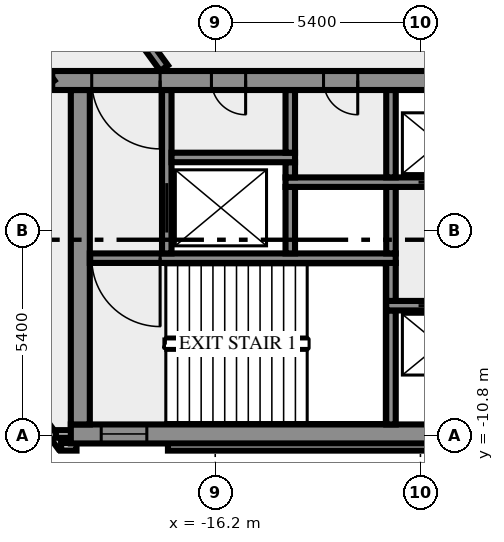
"""IFC4 building model, lengths in metres.
Left out: names, types, materials, properties, quantities, classifications, styles, units other than length and angle.
Written with IfcOpenShell. Run it as: python <this file> out.ifc"""

import sys

from ifc_helpers import new_model, si_unit, direction, frame, frame_2d, origin, place, context, subcontext, project, spatial, rectangle, extrude, element, fill, save


model = new_model("IFC4")
c1 = context("Model", 3, precision=1e-05, world=origin(), true_north=direction((0.0, 1.0)))
c2 = subcontext(c1, "Body", "Model", "MODEL_VIEW")
j1 = project(units=[si_unit("LENGTHUNIT", "METRE"), si_unit("PLANEANGLEUNIT", "RADIAN")], contexts=[c1])
p1 = place(None, origin())
s1 = spatial("IfcSite", under=j1, at=p1, CompositionType="ELEMENT")
p2 = place(p1, origin())
s2 = spatial("IfcBuilding", under=s1, at=p2, CompositionType="ELEMENT")
p3 = place(p2, frame((0.0, 0.0, 67.0)))
s3 = spatial("IfcBuildingStorey", under=s2, at=p3, CompositionType="ELEMENT", Elevation=67.0)
p4 = place(p3, frame((-21.833, -8.909, 0.0), z_axis=(0.0, 0.0, 1.0), x_axis=(0.587766567315, -0.809030569476, 0.0)))
e1 = element("IfcWall", 1, at=p4, inside=s3, PredefinedType="SOLIDWALL", context=c2, shape_type="SweptSolid", body=[
    extrude(rectangle(XDim=2.688, YDim=0.2, at=frame_2d((1.344, 0.0))), origin(), (0.0, 0.0, 1.0), 3.65),
])
p5 = place(p3, frame((-20.256, -11.088, 0.0), z_axis=(0.0, 0.0, 1.0), x_axis=(1.0, 0.0, 0.0)))
e2 = element("IfcWall", 2, at=p5, inside=s3, PredefinedType="SOLIDWALL", context=c2, shape_type="SweptSolid", body=[
    extrude(rectangle(XDim=0.406, YDim=0.2, at=frame_2d((0.203, 0.0))), origin(), (0.0, 0.0, 1.0), 3.65),
])
p6 = place(p3, frame((-17.444, -11.088, 0.0), z_axis=(0.0, 0.0, 1.0), x_axis=(1.0, 0.0, 0.0)))
e3 = element("IfcWall", 3, at=p6, inside=s3, PredefinedType="SOLIDWALL", context=c2, shape_type="SweptSolid", body=[
    extrude(rectangle(XDim=34.888, YDim=0.2, at=frame_2d((17.444, 0.0))), origin(), (0.0, 0.0, 1.0), 3.65),
])
p7 = place(p3, frame((-19.98, -10.75, 0.0), z_axis=(0.0, 0.0, 1.0), x_axis=(-1.0, 0.0, 0.0)))
e4 = element("IfcWall", 4, at=p7, inside=s3, PredefinedType="SOLIDWALL", context=c2, shape_type="SweptSolid", body=[
    extrude(rectangle(XDim=0.417, YDim=0.2, at=frame_2d((0.208, 0.0))), origin(), (0.0, 0.0, 1.0), 3.65),
])
p8 = place(p3, frame((-20.0, -10.75, 0.0), z_axis=(0.0, 0.0, 1.0), x_axis=(1.0, 0.0, 0.0)))
e5 = element("IfcWall", 5, at=p8, inside=s3, PredefinedType="SHEAR", context=c2, shape_type="SweptSolid", body=[
    extrude(rectangle(XDim=40.0, YDim=0.5, at=frame_2d((20.0, 0.0))), origin(), (0.0, 0.0, 1.0), 3.65),
])
p9 = place(p8, frame((0.8, 0.0, 1.0)))
e6 = element("IfcOpeningElement", 6, at=p9, cuts=e5, PredefinedType="OPENING", context=c2, shape_type="SweptSolid", body=[
    extrude(rectangle(XDim=1.2, YDim=1.2, at=frame_2d((0.6, 0.6))), frame((0.0, 0.26, 0.0), z_axis=(0.0, -1.0, 0.0), x_axis=(1.0, 0.0, 0.0)), (0.0, 0.0, 1.0), 0.52),
])
p10 = place(p8, frame((38.0, 0.0, 1.0)))
e7 = element("IfcOpeningElement", 7, at=p10, cuts=e5, PredefinedType="OPENING", context=c2, shape_type="SweptSolid", body=[
    extrude(rectangle(XDim=1.2, YDim=1.2, at=frame_2d((0.6, 0.6))), frame((0.0, 0.26, 0.0), z_axis=(0.0, -1.0, 0.0), x_axis=(1.0, 0.0, 0.0)), (0.0, 0.0, 1.0), 0.52),
])
p11 = place(p3, frame((-19.75, -10.5, 0.0), z_axis=(0.0, 0.0, 1.0), x_axis=(0.0, 1.0, 0.0)))
e8 = element("IfcWall", 8, at=p11, inside=s3, PredefinedType="SHEAR", context=c2, shape_type="SweptSolid", body=[
    extrude(rectangle(XDim=8.8, YDim=0.5, at=frame_2d((4.4, 0.0))), origin(), (0.0, 0.0, 1.0), 3.65),
])
p12 = place(p3, frame((-11.575, -10.5, 0.0), z_axis=(0.0, 0.0, 1.0), x_axis=(0.0, 1.0, 0.0)))
e9 = element("IfcWall", 9, at=p12, inside=s3, PredefinedType="SHEAR", context=c2, shape_type="SweptSolid", body=[
    extrude(rectangle(XDim=3.0, YDim=0.25, at=frame_2d((1.5, 0.0))), origin(), (0.0, 0.0, 1.0), 3.65),
])
p13 = place(p3, frame((11.7, -7.375, 0.0), z_axis=(0.0, 0.0, 1.0), x_axis=(-1.0, 0.0, 0.0)))
e10 = element("IfcWall", 10, at=p13, inside=s3, PredefinedType="SHEAR", context=c2, shape_type="SweptSolid", body=[
    extrude(rectangle(XDim=23.4, YDim=0.25, at=frame_2d((11.7, 0.0))), origin(), (0.0, 0.0, 1.0), 3.65),
])
p14 = place(p13, frame((21.45, 0.0, 0.0)))
e11 = element("IfcOpeningElement", 11, at=p14, cuts=e10, PredefinedType="OPENING", context=c2, shape_type="SweptSolid", body=[
    extrude(rectangle(XDim=1.1, YDim=2.1, at=frame_2d((0.55, 1.05))), frame((0.0, 0.135, 0.0), z_axis=(0.0, -1.0, 0.0), x_axis=(1.0, 0.0, 0.0)), (0.0, 0.0, 1.0), 0.27),
])
p15 = place(p13, frame((18.95, 0.0, 0.0)))
e12 = element("IfcOpeningElement", 12, at=p15, cuts=e10, PredefinedType="OPENING", context=c2, shape_type="SweptSolid", body=[
    extrude(rectangle(XDim=1.1, YDim=2.1, at=frame_2d((0.55, 1.05))), frame((0.0, 0.135, 0.0), z_axis=(0.0, -1.0, 0.0), x_axis=(1.0, 0.0, 0.0)), (0.0, 0.0, 1.0), 0.27),
])
p16 = place(p13, frame((16.45, 0.0, 0.0)))
e13 = element("IfcOpeningElement", 13, at=p16, cuts=e10, PredefinedType="OPENING", context=c2, shape_type="SweptSolid", body=[
    extrude(rectangle(XDim=1.1, YDim=2.1, at=frame_2d((0.55, 1.05))), frame((0.0, 0.135, 0.0), z_axis=(0.0, -1.0, 0.0), x_axis=(1.0, 0.0, 0.0)), (0.0, 0.0, 1.0), 0.27),
])
p17 = place(p13, frame((14.65, 0.0, 0.0)))
e14 = element("IfcOpeningElement", 14, at=p17, cuts=e10, PredefinedType="OPENING", context=c2, shape_type="SweptSolid", body=[
    extrude(rectangle(XDim=0.8, YDim=2.1, at=frame_2d((0.4, 1.05))), frame((0.0, 0.135, 0.0), z_axis=(0.0, -1.0, 0.0), x_axis=(1.0, 0.0, 0.0)), (0.0, 0.0, 1.0), 0.27),
])
p18 = place(p13, frame((12.8, 0.0, 0.0)))
e15 = element("IfcOpeningElement", 15, at=p18, cuts=e10, PredefinedType="OPENING", context=c2, shape_type="SweptSolid", body=[
    extrude(rectangle(XDim=0.9, YDim=2.1, at=frame_2d((0.45, 1.05))), frame((0.0, 0.135, 0.0), z_axis=(0.0, -1.0, 0.0), x_axis=(1.0, 0.0, 0.0)), (0.0, 0.0, 1.0), 0.27),
])
p19 = place(p13, frame((10.7, 0.0, 0.0)))
e16 = element("IfcOpeningElement", 16, at=p19, cuts=e10, PredefinedType="OPENING", context=c2, shape_type="SweptSolid", body=[
    extrude(rectangle(XDim=0.9, YDim=2.1, at=frame_2d((0.45, 1.05))), frame((0.0, 0.135, 0.0), z_axis=(0.0, -1.0, 0.0), x_axis=(1.0, 0.0, 0.0)), (0.0, 0.0, 1.0), 0.27),
])
p20 = place(p3, frame((-11.575, -7.25, 0.0), z_axis=(0.0, 0.0, 1.0), x_axis=(0.0, 1.0, 0.0)))
e17 = element("IfcWall", 17, at=p20, inside=s3, PredefinedType="SHEAR", context=c2, shape_type="SweptSolid", body=[
    extrude(rectangle(XDim=1.0, YDim=0.25, at=frame_2d((0.5, 0.0))), origin(), (0.0, 0.0, 1.0), 3.65),
])
p21 = place(p3, frame((-11.45, -6.125, 0.0), z_axis=(0.0, 0.0, 1.0), x_axis=(-1.0, 0.0, 0.0)))
e18 = element("IfcWall", 18, at=p21, inside=s3, PredefinedType="SHEAR", context=c2, shape_type="SweptSolid", body=[
    extrude(rectangle(XDim=8.05, YDim=0.25, at=frame_2d((4.025, 0.0))), origin(), (0.0, 0.0, 1.0), 3.65),
])
p22 = place(p21, frame((6.2, 0.0, 0.0)))
e19 = element("IfcOpeningElement", 19, at=p22, cuts=e18, PredefinedType="OPENING", context=c2, shape_type="SweptSolid", body=[
    extrude(rectangle(XDim=1.8, YDim=2.1, at=frame_2d((0.9, 1.05))), frame((0.0, 0.135, 0.0), z_axis=(0.0, -1.0, 0.0), x_axis=(1.0, 0.0, 0.0)), (0.0, 0.0, 1.0), 0.27),
])
p23 = place(p3, frame((-17.475, -6.0, 0.0), z_axis=(0.0, 0.0, 1.0), x_axis=(0.0, 1.0, 0.0)))
e20 = element("IfcWall", 20, at=p23, inside=s3, PredefinedType="SHEAR", context=c2, shape_type="SweptSolid", body=[
    extrude(rectangle(XDim=4.3, YDim=0.25, at=frame_2d((2.15, 0.0))), origin(), (0.0, 0.0, 1.0), 3.65),
])
p24 = place(p23, frame((0.55, 0.0, 0.0)))
e21 = element("IfcOpeningElement", 21, at=p24, cuts=e20, PredefinedType="OPENING", context=c2, shape_type="SweptSolid", body=[
    extrude(rectangle(XDim=1.3, YDim=2.1, at=frame_2d((0.65, 1.05))), frame((0.0, 0.135, 0.0), z_axis=(0.0, -1.0, 0.0), x_axis=(1.0, 0.0, 0.0)), (0.0, 0.0, 1.0), 0.27),
])
for number, where, z_axis, x_axis in (
    (22, (-14.225, -6.0, 0.0), (0.0, 0.0, 1.0), (0.0, 1.0, 0.0)),
    (23, (-11.575, -6.0, 0.0), (0.0, 0.0, 1.0), (0.0, 1.0, 0.0)),
):
    element("IfcWall", number, at=place(p3, frame(where, z_axis=z_axis, x_axis=x_axis)), inside=s3, PredefinedType="SHEAR", context=c2, shape_type="SweptSolid", body=[
        extrude(rectangle(XDim=1.75, YDim=0.25, at=frame_2d((0.875, 0.0))), origin(), (0.0, 0.0, 1.0), 3.65),
    ])
p25 = place(p3, frame((-14.35, -4.125, 0.0), z_axis=(0.0, 0.0, 1.0), x_axis=(1.0, 0.0, 0.0)))
e24 = element("IfcWall", 24, at=p25, inside=s3, PredefinedType="SHEAR", context=c2, shape_type="SweptSolid", body=[
    extrude(rectangle(XDim=10.4, YDim=0.25, at=frame_2d((5.2, 0.0))), origin(), (0.0, 0.0, 1.0), 3.65),
])
p26 = place(p25, frame((3.5, 0.0, 0.0)))
e25 = element("IfcOpeningElement", 25, at=p26, cuts=e24, PredefinedType="OPENING", context=c2, shape_type="SweptSolid", body=[
    extrude(rectangle(XDim=1.1, YDim=2.1, at=frame_2d((0.55, 1.05))), frame((0.0, 0.135, 0.0), z_axis=(0.0, -1.0, 0.0), x_axis=(1.0, 0.0, 0.0)), (0.0, 0.0, 1.0), 0.27),
])
p27 = place(p25, frame((6.0, 0.0, 0.0)))
e26 = element("IfcOpeningElement", 26, at=p27, cuts=e24, PredefinedType="OPENING", context=c2, shape_type="SweptSolid", body=[
    extrude(rectangle(XDim=1.1, YDim=2.1, at=frame_2d((0.55, 1.05))), frame((0.0, 0.135, 0.0), z_axis=(0.0, -1.0, 0.0), x_axis=(1.0, 0.0, 0.0)), (0.0, 0.0, 1.0), 0.27),
])
p28 = place(p25, frame((8.5, 0.0, 0.0)))
e27 = element("IfcOpeningElement", 27, at=p28, cuts=e24, PredefinedType="OPENING", context=c2, shape_type="SweptSolid", body=[
    extrude(rectangle(XDim=1.1, YDim=2.1, at=frame_2d((0.55, 1.05))), frame((0.0, 0.135, 0.0), z_axis=(0.0, -1.0, 0.0), x_axis=(1.0, 0.0, 0.0)), (0.0, 0.0, 1.0), 0.27),
])
p29 = place(p3, frame((-14.225, -4.0, 0.0), z_axis=(0.0, 0.0, 1.0), x_axis=(0.0, 1.0, 0.0)))
e28 = element("IfcWall", 28, at=p29, inside=s3, PredefinedType="SHEAR", context=c2, shape_type="SweptSolid", body=[
    extrude(rectangle(XDim=0.4, YDim=0.25, at=frame_2d((0.2, 0.0))), origin(), (0.0, 0.0, 1.0), 3.65),
])
p30 = place(p3, frame((-11.575, -4.0, 0.0), z_axis=(0.0, 0.0, 1.0), x_axis=(0.0, 1.0, 0.0)))
e29 = element("IfcWall", 29, at=p30, inside=s3, PredefinedType="SHEAR", context=c2, shape_type="SweptSolid", body=[
    extrude(rectangle(XDim=2.3, YDim=0.25, at=frame_2d((1.15, 0.0))), origin(), (0.0, 0.0, 1.0), 3.65),
])
p31 = place(p3, frame((-17.35, -3.475, 0.0), z_axis=(0.0, 0.0, 1.0), x_axis=(1.0, 0.0, 0.0)))
e30 = element("IfcWall", 30, at=p31, inside=s3, PredefinedType="SHEAR", context=c2, shape_type="SweptSolid", body=[
    extrude(rectangle(XDim=3.25, YDim=0.25, at=frame_2d((1.625, 0.0))), origin(), (0.0, 0.0, 1.0), 3.65),
])
p32 = place(p3, frame((-14.225, -3.35, 0.0), z_axis=(0.0, 0.0, 1.0), x_axis=(0.0, 1.0, 0.0)))
e31 = element("IfcWall", 31, at=p32, inside=s3, PredefinedType="SHEAR", context=c2, shape_type="SweptSolid", body=[
    extrude(rectangle(XDim=1.65, YDim=0.25, at=frame_2d((0.825, 0.0))), origin(), (0.0, 0.0, 1.0), 3.65),
])
p33 = place(p3, frame((20.49, -1.45, 0.0), z_axis=(0.0, 0.0, 1.0), x_axis=(-1.0, 0.0, 0.0)))
e32 = element("IfcWall", 32, at=p33, inside=s3, PredefinedType="SHEAR", context=c2, shape_type="SweptSolid", body=[
    extrude(rectangle(XDim=40.98, YDim=0.5, at=frame_2d((20.49, 0.0))), origin(), (0.0, 0.0, 1.0), 3.65),
])
p34 = place(p33, frame((38.14, 0.0, 0.0)))
e33 = element("IfcOpeningElement", 33, at=p34, cuts=e32, PredefinedType="OPENING", context=c2, shape_type="SweptSolid", body=[
    extrude(rectangle(XDim=1.8, YDim=2.1, at=frame_2d((0.9, 1.05))), frame((0.0, 0.26, 0.0), z_axis=(0.0, -1.0, 0.0), x_axis=(1.0, 0.0, 0.0)), (0.0, 0.0, 1.0), 0.52),
])
p35 = place(p33, frame((35.89, 0.0, 0.0)))
e34 = element("IfcOpeningElement", 34, at=p35, cuts=e32, PredefinedType="OPENING", context=c2, shape_type="SweptSolid", body=[
    extrude(rectangle(XDim=0.9, YDim=2.1, at=frame_2d((0.45, 1.05))), frame((0.0, 0.26, 0.0), z_axis=(0.0, -1.0, 0.0), x_axis=(1.0, 0.0, 0.0)), (0.0, 0.0, 1.0), 0.52),
])
p36 = place(p33, frame((32.94, 0.0, 0.0)))
e35 = element("IfcOpeningElement", 35, at=p36, cuts=e32, PredefinedType="OPENING", context=c2, shape_type="SweptSolid", body=[
    extrude(rectangle(XDim=0.9, YDim=2.1, at=frame_2d((0.45, 1.05))), frame((0.0, 0.26, 0.0), z_axis=(0.0, -1.0, 0.0), x_axis=(1.0, 0.0, 0.0)), (0.0, 0.0, 1.0), 0.52),
])
p37 = place(p33, frame((21.765, 0.0, 0.0)))
e36 = element("IfcOpeningElement", 36, at=p37, cuts=e32, PredefinedType="OPENING", context=c2, shape_type="SweptSolid", body=[
    extrude(rectangle(XDim=2.0, YDim=2.1, at=frame_2d((1.0, 1.05))), frame((0.0, 0.26, 0.0), z_axis=(0.0, -1.0, 0.0), x_axis=(1.0, 0.0, 0.0)), (0.0, 0.0, 1.0), 0.52),
])
p38 = place(p33, frame((7.14, 0.0, 0.0)))
e37 = element("IfcOpeningElement", 37, at=p38, cuts=e32, PredefinedType="OPENING", context=c2, shape_type="SweptSolid", body=[
    extrude(rectangle(XDim=0.9, YDim=2.1, at=frame_2d((0.45, 1.05))), frame((0.0, 0.26, 0.0), z_axis=(0.0, -1.0, 0.0), x_axis=(1.0, 0.0, 0.0)), (0.0, 0.0, 1.0), 0.52),
])
p39 = place(p33, frame((5.028, 0.0, 0.0)))
e38 = element("IfcOpeningElement", 38, at=p39, cuts=e32, PredefinedType="OPENING", context=c2, shape_type="SweptSolid", body=[
    extrude(rectangle(XDim=0.8, YDim=2.1, at=frame_2d((0.4, 1.05))), frame((0.0, 0.26, 0.0), z_axis=(0.0, -1.0, 0.0), x_axis=(1.0, 0.0, 0.0)), (0.0, 0.0, 1.0), 0.52),
])
p40 = place(p33, frame((3.452, 0.0, 0.0)))
e39 = element("IfcOpeningElement", 39, at=p40, cuts=e32, PredefinedType="OPENING", context=c2, shape_type="SweptSolid", body=[
    extrude(rectangle(XDim=0.8, YDim=2.1, at=frame_2d((0.4, 1.05))), frame((0.0, 0.26, 0.0), z_axis=(0.0, -1.0, 0.0), x_axis=(1.0, 0.0, 0.0)), (0.0, 0.0, 1.0), 0.52),
])
p41 = place(p33, frame((1.04, 0.0, 0.0)))
e40 = element("IfcOpeningElement", 40, at=p41, cuts=e32, PredefinedType="OPENING", context=c2, shape_type="SweptSolid", body=[
    extrude(rectangle(XDim=1.8, YDim=2.1, at=frame_2d((0.9, 1.05))), frame((0.0, 0.26, 0.0), z_axis=(0.0, -1.0, 0.0), x_axis=(1.0, 0.0, 0.0)), (0.0, 0.0, 1.0), 0.52),
])
p42 = place(p3, frame((-20.531, -1.523, 0.0), z_axis=(0.0, 0.0, 1.0), x_axis=(-0.587784593204, 0.809017473231, 0.0)))
e41 = element("IfcWall", 41, at=p42, inside=s3, PredefinedType="SOLIDWALL", context=c2, shape_type="SweptSolid", body=[
    extrude(rectangle(XDim=44.67, YDim=0.25, at=frame_2d((22.335, 0.0))), origin(), (0.0, 0.0, 1.0), 3.65),
])
p43 = place(p42, frame((0.533, 0.0, 0.0)))
e42 = element("IfcOpeningElement", 42, at=p43, cuts=e41, PredefinedType="OPENING", context=c2, shape_type="SweptSolid", body=[
    extrude(rectangle(XDim=0.9, YDim=2.1, at=frame_2d((0.45, 1.05))), frame((0.0, 0.135, 0.0), z_axis=(0.0, -1.0, 0.0), x_axis=(1.0, 0.0, 0.0)), (0.0, 0.0, 1.0), 0.27),
])
p44 = place(p42, frame((32.531, 0.0, 0.0)))
e43 = element("IfcOpeningElement", 43, at=p44, cuts=e41, PredefinedType="OPENING", context=c2, shape_type="SweptSolid", body=[
    extrude(rectangle(XDim=1.8, YDim=2.1, at=frame_2d((0.9, 1.05))), frame((0.0, 0.135, 0.0), z_axis=(0.0, -1.0, 0.0), x_axis=(1.0, 0.0, 0.0)), (0.0, 0.0, 1.0), 0.27),
])
p45 = place(p42, frame((14.566, 0.0, 0.0)))
e44 = element("IfcOpeningElement", 44, at=p45, cuts=e41, PredefinedType="OPENING", context=c2, shape_type="SweptSolid", body=[
    extrude(rectangle(XDim=0.9, YDim=2.1, at=frame_2d((0.45, 1.05))), frame((0.0, 0.135, 0.0), z_axis=(0.0, -1.0, 0.0), x_axis=(1.0, 0.0, 0.0)), (0.0, 0.0, 1.0), 0.27),
])
p46 = place(p3, frame((-37.232, 25.972, 0.0), z_axis=(0.0, 0.0, 1.0), x_axis=(0.587786323093, -0.809016216391, 0.0)))
e45 = element("IfcWall", 45, at=p46, inside=s3, PredefinedType="SOLIDWALL", context=c2, shape_type="SweptSolid", body=[
    extrude(rectangle(XDim=33.493, YDim=0.25, at=frame_2d((16.747, 0.0))), origin(), (0.0, 0.0, 1.0), 3.65),
])
p47 = place(p46, frame((16.435, 0.0, 0.0)))
e46 = element("IfcOpeningElement", 46, at=p47, cuts=e45, PredefinedType="OPENING", context=c2, shape_type="SweptSolid", body=[
    extrude(rectangle(XDim=0.9, YDim=2.1, at=frame_2d((0.45, 1.05))), frame((0.0, 0.135, 0.0), z_axis=(0.0, -1.0, 0.0), x_axis=(1.0, 0.0, 0.0)), (0.0, 0.0, 1.0), 0.27),
])
p48 = place(p46, frame((7.137, 0.0, 0.0)))
e47 = element("IfcOpeningElement", 47, at=p48, cuts=e45, PredefinedType="OPENING", context=c2, shape_type="SweptSolid", body=[
    extrude(rectangle(XDim=1.8, YDim=2.1, at=frame_2d((0.9, 1.05))), frame((0.0, 0.135, 0.0), z_axis=(0.0, -1.0, 0.0), x_axis=(1.0, 0.0, 0.0)), (0.0, 0.0, 1.0), 0.27),
])
p49 = place(p9, origin())
e48 = element("IfcWindow", 48, at=p49, inside=s3, PartitioningType="SINGLE_PANEL", PredefinedType="WINDOW", context=c2, shape_type="SweptSolid", body=[
    extrude(rectangle(XDim=1.2, YDim=1.2, at=frame_2d((0.6, 0.6))), frame((0.0, 0.03, 0.0), z_axis=(0.0, -1.0, 0.0), x_axis=(1.0, 0.0, 0.0)), (0.0, 0.0, 1.0), 0.06),
])
fill(e6, e48)
p50 = place(p14, origin())
e49 = element("IfcDoor", 49, at=p50, inside=s3, OperationType="DOUBLE_DOOR_SLIDING", PredefinedType="DOOR", context=c2, shape_type="SweptSolid", body=[
    extrude(rectangle(XDim=1.1, YDim=2.1, at=frame_2d((0.55, 1.05))), frame((0.0, 0.025, 0.0), z_axis=(0.0, -1.0, 0.0), x_axis=(1.0, 0.0, 0.0)), (0.0, 0.0, 1.0), 0.05),
])
fill(e11, e49)
p51 = place(p22, origin())
e50 = element("IfcDoor", 50, at=p51, inside=s3, OperationType="DOUBLE_DOOR_SINGLE_SWING", PredefinedType="DOOR", context=c2, shape_type="SweptSolid", body=[
    extrude(rectangle(XDim=1.8, YDim=2.1, at=frame_2d((0.9, 1.05))), frame((0.0, 0.025, 0.0), z_axis=(0.0, -1.0, 0.0), x_axis=(1.0, 0.0, 0.0)), (0.0, 0.0, 1.0), 0.05),
])
fill(e19, e50)
p52 = place(p24, origin())
e51 = element("IfcDoor", 51, at=p52, inside=s3, OperationType="DOUBLE_DOOR_SLIDING", PredefinedType="DOOR", context=c2, shape_type="SweptSolid", body=[
    extrude(rectangle(XDim=1.3, YDim=2.1, at=frame_2d((0.65, 1.05))), frame((0.0, 0.025, 0.0), z_axis=(0.0, -1.0, 0.0), x_axis=(1.0, 0.0, 0.0)), (0.0, 0.0, 1.0), 0.05),
])
fill(e21, e51)
p53 = place(p26, origin())
e52 = element("IfcDoor", 52, at=p53, inside=s3, OperationType="DOUBLE_DOOR_SLIDING", PredefinedType="DOOR", context=c2, shape_type="SweptSolid", body=[
    extrude(rectangle(XDim=1.1, YDim=2.1, at=frame_2d((0.55, 1.05))), frame((0.0, 0.025, 0.0), z_axis=(0.0, -1.0, 0.0), x_axis=(1.0, 0.0, 0.0)), (0.0, 0.0, 1.0), 0.05),
])
fill(e25, e52)
p54 = place(p34, origin())
e53 = element("IfcDoor", 53, at=p54, inside=s3, OperationType="DOUBLE_DOOR_SINGLE_SWING", PredefinedType="DOOR", context=c2, shape_type="SweptSolid", body=[
    extrude(rectangle(XDim=1.8, YDim=2.1, at=frame_2d((0.9, 1.05))), frame((0.0, 0.025, 0.0), z_axis=(0.0, -1.0, 0.0), x_axis=(1.0, 0.0, 0.0)), (0.0, 0.0, 1.0), 0.05),
])
fill(e33, e53)
p55 = place(p35, origin())
e54 = element("IfcDoor", 54, at=p55, inside=s3, OperationType="SINGLE_SWING_RIGHT", PredefinedType="DOOR", context=c2, shape_type="SweptSolid", body=[
    extrude(rectangle(XDim=0.9, YDim=2.1, at=frame_2d((0.45, 1.05))), frame((0.0, 0.025, 0.0), z_axis=(0.0, -1.0, 0.0), x_axis=(1.0, 0.0, 0.0)), (0.0, 0.0, 1.0), 0.05),
])
fill(e34, e54)
p56 = place(p36, origin())
e55 = element("IfcDoor", 55, at=p56, inside=s3, OperationType="SINGLE_SWING_RIGHT", PredefinedType="DOOR", context=c2, shape_type="SweptSolid", body=[
    extrude(rectangle(XDim=0.9, YDim=2.1, at=frame_2d((0.45, 1.05))), frame((0.0, 0.025, 0.0), z_axis=(0.0, -1.0, 0.0), x_axis=(1.0, 0.0, 0.0)), (0.0, 0.0, 1.0), 0.05),
])
fill(e35, e55)
save(model, sys.argv[1])
